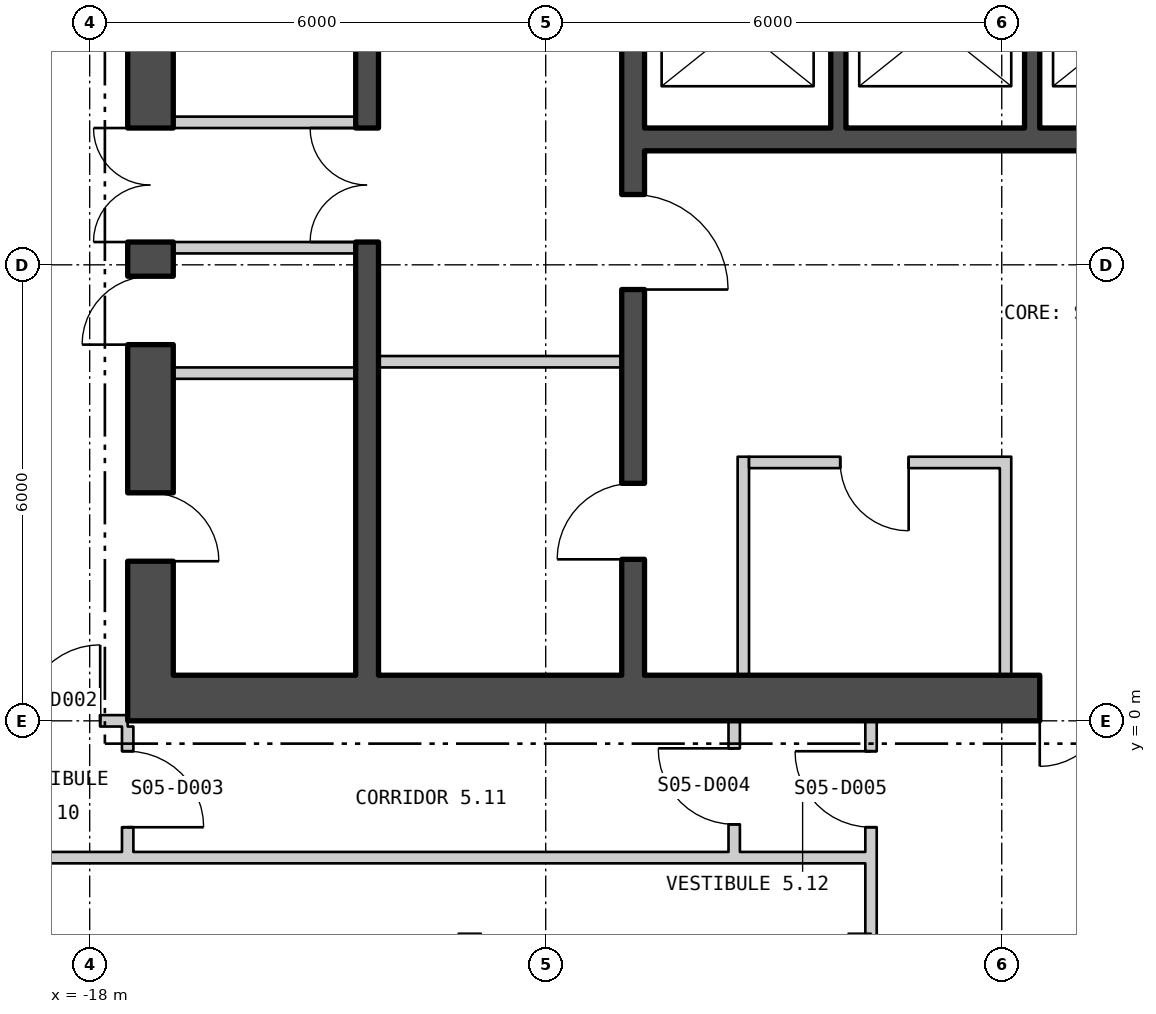
"""IFC4 building model, lengths in metres.
Left out: names, types, materials, properties, quantities, classifications, styles, units other than length and angle.
Written with IfcOpenShell. Run it as: python <this file> out.ifc"""

import sys

from ifc_helpers import new_model, si_unit, direction, frame, frame_2d, origin, origin_2d, place, context, subcontext, project, spatial, polyline, rectangle, i_section, outline, extrude, element, fill, save


model = new_model("IFC4")
c1 = context("Model", 3, precision=1e-05, world=origin(), true_north=direction((0.0, 1.0)))
c2 = subcontext(c1, "Body", "Model", "MODEL_VIEW")
j1 = project(units=[si_unit("LENGTHUNIT", "METRE"), si_unit("PLANEANGLEUNIT", "RADIAN")], contexts=[c1])
p1 = place(None, origin())
s1 = spatial("IfcSite", under=j1, at=p1, CompositionType="ELEMENT")
p2 = place(p1, origin())
s2 = spatial("IfcBuilding", under=s1, at=p2, CompositionType="ELEMENT")
p3 = place(p2, frame((0.0, 0.0, 69.3)))
s3 = spatial("IfcBuildingStorey", under=s2, at=p3, CompositionType="ELEMENT", Elevation=69.3)
for number, where, z_axis, x_axis in (
    (1, (-7.87, -3.2, 0.0), (0.0, 0.0, 1.0), (1.0, 0.0, 0.0)),
    (2, (-13.0, -3.2, 0.0), (0.0, 0.0, 1.0), (1.0, 0.0, 0.0)),
):
    element("IfcColumn", number, at=place(p3, frame(where, z_axis=z_axis, x_axis=x_axis)), inside=s3, PredefinedType="COLUMN", context=c2, shape_type="SweptSolid", body=[
        extrude(i_section(OverallWidth=0.303, OverallDepth=0.814, WebThickness=0.021, FlangeThickness=0.04, at=origin_2d()), origin(), (0.0, 0.0, 1.0), 4.5),
    ])
p4 = place(p3, frame((-28.18, 10.778, -0.18), z_axis=(0.0, 0.0, 1.0), x_axis=(0.500000711659, -0.866024992908, 0.0)))
e3 = element("IfcWall", 3, at=p4, inside=s3, PredefinedType="SOLIDWALL", context=c2, shape_type="SweptSolid", body=[
    extrude(outline(polyline([(-0.13, -0.225), (45.87, -0.225), (45.61, 0.225), (0.13, 0.225), (-0.13, -0.225)])), origin(), (0.0, 0.0, 1.0), 4.28),
])
p5 = place(p4, frame((1.424, 0.0, 1.08)))
e4 = element("IfcOpeningElement", 4, at=p5, cuts=e3, PredefinedType="OPENING", context=c2, shape_type="SweptSolid", body=[
    extrude(rectangle(XDim=2.4, YDim=2.6, at=frame_2d((1.2, 1.3))), frame((0.0, 0.235, 0.0), z_axis=(0.0, -1.0, 0.0), x_axis=(1.0, 0.0, 0.0)), (0.0, 0.0, 1.0), 0.47),
])
p6 = place(p4, frame((5.893, 0.0, 1.08)))
e5 = element("IfcOpeningElement", 5, at=p6, cuts=e3, PredefinedType="OPENING", context=c2, shape_type="SweptSolid", body=[
    extrude(rectangle(XDim=2.4, YDim=2.6, at=frame_2d((1.2, 1.3))), frame((0.0, 0.235, 0.0), z_axis=(0.0, -1.0, 0.0), x_axis=(1.0, 0.0, 0.0)), (0.0, 0.0, 1.0), 0.47),
])
p7 = place(p4, frame((10.401, 0.0, 1.08)))
e6 = element("IfcOpeningElement", 6, at=p7, cuts=e3, PredefinedType="OPENING", context=c2, shape_type="SweptSolid", body=[
    extrude(rectangle(XDim=2.4, YDim=2.6, at=frame_2d((1.2, 1.3))), frame((0.0, 0.235, 0.0), z_axis=(0.0, -1.0, 0.0), x_axis=(1.0, 0.0, 0.0)), (0.0, 0.0, 1.0), 0.47),
])
p8 = place(p4, frame((14.909, 0.0, 1.08)))
e7 = element("IfcOpeningElement", 7, at=p8, cuts=e3, PredefinedType="OPENING", context=c2, shape_type="SweptSolid", body=[
    extrude(rectangle(XDim=2.4, YDim=2.6, at=frame_2d((1.2, 1.3))), frame((0.0, 0.235, 0.0), z_axis=(0.0, -1.0, 0.0), x_axis=(1.0, 0.0, 0.0)), (0.0, 0.0, 1.0), 0.47),
])
p9 = place(p4, frame((19.416, 0.0, 1.08)))
e8 = element("IfcOpeningElement", 8, at=p9, cuts=e3, PredefinedType="OPENING", context=c2, shape_type="SweptSolid", body=[
    extrude(rectangle(XDim=2.4, YDim=2.6, at=frame_2d((1.2, 1.3))), frame((0.0, 0.235, 0.0), z_axis=(0.0, -1.0, 0.0), x_axis=(1.0, 0.0, 0.0)), (0.0, 0.0, 1.0), 0.47),
])
p10 = place(p4, frame((23.924, 0.0, 1.08)))
e9 = element("IfcOpeningElement", 9, at=p10, cuts=e3, PredefinedType="OPENING", context=c2, shape_type="SweptSolid", body=[
    extrude(rectangle(XDim=2.4, YDim=2.6, at=frame_2d((1.2, 1.3))), frame((0.0, 0.235, 0.0), z_axis=(0.0, -1.0, 0.0), x_axis=(1.0, 0.0, 0.0)), (0.0, 0.0, 1.0), 0.47),
])
p11 = place(p4, frame((28.431, 0.0, 1.08)))
e10 = element("IfcOpeningElement", 10, at=p11, cuts=e3, PredefinedType="OPENING", context=c2, shape_type="SweptSolid", body=[
    extrude(rectangle(XDim=2.4, YDim=2.6, at=frame_2d((1.2, 1.3))), frame((0.0, 0.235, 0.0), z_axis=(0.0, -1.0, 0.0), x_axis=(1.0, 0.0, 0.0)), (0.0, 0.0, 1.0), 0.47),
])
p12 = place(p4, frame((32.939, 0.0, 1.08)))
e11 = element("IfcOpeningElement", 11, at=p12, cuts=e3, PredefinedType="OPENING", context=c2, shape_type="SweptSolid", body=[
    extrude(rectangle(XDim=2.4, YDim=2.6, at=frame_2d((1.2, 1.3))), frame((0.0, 0.235, 0.0), z_axis=(0.0, -1.0, 0.0), x_axis=(1.0, 0.0, 0.0)), (0.0, 0.0, 1.0), 0.47),
])
p13 = place(p4, frame((37.447, 0.0, 1.08)))
e12 = element("IfcOpeningElement", 12, at=p13, cuts=e3, PredefinedType="OPENING", context=c2, shape_type="SweptSolid", body=[
    extrude(rectangle(XDim=2.4, YDim=2.6, at=frame_2d((1.2, 1.3))), frame((0.0, 0.235, 0.0), z_axis=(0.0, -1.0, 0.0), x_axis=(1.0, 0.0, 0.0)), (0.0, 0.0, 1.0), 0.47),
])
p14 = place(p4, frame((41.916, 0.0, 1.08)))
e13 = element("IfcOpeningElement", 13, at=p14, cuts=e3, PredefinedType="OPENING", context=c2, shape_type="SweptSolid", body=[
    extrude(rectangle(XDim=2.4, YDim=2.6, at=frame_2d((1.2, 1.3))), frame((0.0, 0.235, 0.0), z_axis=(0.0, -1.0, 0.0), x_axis=(1.0, 0.0, 0.0)), (0.0, 0.0, 1.0), 0.47),
])
p15 = place(p3, frame((-17.5, 0.3, 0.0), z_axis=(0.0, 0.0, 1.0), x_axis=(1.0, 0.0, 0.0)))
e14 = element("IfcWall", 14, at=p15, inside=s3, PredefinedType="SHEAR", context=c2, shape_type="SweptSolid", body=[
    extrude(rectangle(XDim=35.0, YDim=0.6, at=frame_2d((17.5, 0.0))), origin(), (0.0, 0.0, 1.0), 4.3),
])
p16 = place(p15, frame((12.0, 0.0, 0.0)))
e15 = element("IfcOpeningElement", 15, at=p16, cuts=e14, PredefinedType="OPENING", context=c2, shape_type="SweptSolid", body=[
    extrude(rectangle(XDim=1.8, YDim=2.4, at=frame_2d((0.9, 1.2))), frame((0.0, 0.31, 0.0), z_axis=(0.0, -1.0, 0.0), x_axis=(1.0, 0.0, 0.0)), (0.0, 0.0, 1.0), 0.62),
])
p17 = place(p15, frame((22.0, 0.0, 0.0)))
e16 = element("IfcOpeningElement", 16, at=p17, cuts=e14, PredefinedType="OPENING", context=c2, shape_type="SweptSolid", body=[
    extrude(rectangle(XDim=1.8, YDim=2.4, at=frame_2d((0.9, 1.2))), frame((0.0, 0.31, 0.0), z_axis=(0.0, -1.0, 0.0), x_axis=(1.0, 0.0, 0.0)), (0.0, 0.0, 1.0), 0.62),
])
p18 = place(p3, frame((-17.2, 0.6, 0.0), z_axis=(0.0, 0.0, 1.0), x_axis=(0.0, 1.0, 0.0)))
e17 = element("IfcWall", 17, at=p18, inside=s3, PredefinedType="SHEAR", context=c2, shape_type="SweptSolid", body=[
    extrude(rectangle(XDim=16.8, YDim=0.6, at=frame_2d((8.4, 0.0))), origin(), (0.0, 0.0, 1.0), 4.3),
])
p19 = place(p18, frame((5.7, 0.0, 0.0)))
e18 = element("IfcOpeningElement", 18, at=p19, cuts=e17, PredefinedType="OPENING", context=c2, shape_type="SweptSolid", body=[
    extrude(rectangle(XDim=1.5, YDim=2.1, at=frame_2d((0.75, 1.05))), frame((0.0, 0.31, 0.0), z_axis=(0.0, -1.0, 0.0), x_axis=(1.0, 0.0, 0.0)), (0.0, 0.0, 1.0), 0.62),
])
p20 = place(p18, frame((1.5, 0.0, 0.0)))
e19 = element("IfcOpeningElement", 19, at=p20, cuts=e17, PredefinedType="OPENING", context=c2, shape_type="SweptSolid", body=[
    extrude(rectangle(XDim=0.9, YDim=2.1, at=frame_2d((0.45, 1.05))), frame((0.0, 0.31, 0.0), z_axis=(0.0, -1.0, 0.0), x_axis=(1.0, 0.0, 0.0)), (0.0, 0.0, 1.0), 0.62),
])
p21 = place(p18, frame((4.35, 0.0, 0.0)))
e20 = element("IfcOpeningElement", 20, at=p21, cuts=e17, PredefinedType="OPENING", context=c2, shape_type="SweptSolid", body=[
    extrude(rectangle(XDim=0.9, YDim=2.1, at=frame_2d((0.45, 1.05))), frame((0.0, 0.31, 0.0), z_axis=(0.0, -1.0, 0.0), x_axis=(1.0, 0.0, 0.0)), (0.0, 0.0, 1.0), 0.62),
])
p22 = place(p18, frame((8.423, 0.0, 0.0)))
e21 = element("IfcOpeningElement", 21, at=p22, cuts=e17, PredefinedType="OPENING", context=c2, shape_type="SweptSolid", body=[
    extrude(rectangle(XDim=1.0, YDim=2.1, at=frame_2d((0.5, 1.05))), frame((0.0, 0.31, 0.0), z_axis=(0.0, -1.0, 0.0), x_axis=(1.0, 0.0, 0.0)), (0.0, 0.0, 1.0), 0.62),
])
p23 = place(p18, frame((13.273, 0.0, 0.0)))
e22 = element("IfcOpeningElement", 22, at=p23, cuts=e17, PredefinedType="OPENING", context=c2, shape_type="SweptSolid", body=[
    extrude(rectangle(XDim=0.9, YDim=2.1, at=frame_2d((0.45, 1.05))), frame((0.0, 0.31, 0.0), z_axis=(0.0, -1.0, 0.0), x_axis=(1.0, 0.0, 0.0)), (0.0, 0.0, 1.0), 0.62),
])
p24 = place(p3, frame((-10.85, 0.6, 0.0), z_axis=(0.0, 0.0, 1.0), x_axis=(0.0, 1.0, 0.0)))
e23 = element("IfcWall", 23, at=p24, inside=s3, PredefinedType="SHEAR", context=c2, shape_type="SweptSolid", body=[
    extrude(rectangle(XDim=16.8, YDim=0.3, at=frame_2d((8.4, 0.0))), origin(), (0.0, 0.0, 1.0), 4.3),
])
p25 = place(p24, frame((5.075, 0.0, 0.0)))
e24 = element("IfcOpeningElement", 24, at=p25, cuts=e23, PredefinedType="OPENING", context=c2, shape_type="SweptSolid", body=[
    extrude(rectangle(XDim=1.25, YDim=2.1, at=frame_2d((0.625, 1.05))), frame((0.0, 0.16, 0.0), z_axis=(0.0, -1.0, 0.0), x_axis=(1.0, 0.0, 0.0)), (0.0, 0.0, 1.0), 0.32),
])
p26 = place(p24, frame((1.525, 0.0, 0.0)))
e25 = element("IfcOpeningElement", 25, at=p26, cuts=e23, PredefinedType="OPENING", context=c2, shape_type="SweptSolid", body=[
    extrude(rectangle(XDim=1.0, YDim=2.1, at=frame_2d((0.5, 1.05))), frame((0.0, 0.16, 0.0), z_axis=(0.0, -1.0, 0.0), x_axis=(1.0, 0.0, 0.0)), (0.0, 0.0, 1.0), 0.32),
])
p27 = place(p3, frame((-14.35, 0.6, 0.0), z_axis=(0.0, 0.0, 1.0), x_axis=(0.0, 1.0, 0.0)))
e26 = element("IfcWall", 26, at=p27, inside=s3, PredefinedType="SHEAR", context=c2, shape_type="SweptSolid", body=[
    extrude(rectangle(XDim=16.8, YDim=0.3, at=frame_2d((8.4, 0.0))), origin(), (0.0, 0.0, 1.0), 4.3),
])
p28 = place(p27, frame((5.7, 0.0, 0.0)))
e27 = element("IfcOpeningElement", 27, at=p28, cuts=e26, PredefinedType="OPENING", context=c2, shape_type="SweptSolid", body=[
    extrude(rectangle(XDim=1.5, YDim=2.1, at=frame_2d((0.75, 1.05))), frame((0.0, 0.16, 0.0), z_axis=(0.0, -1.0, 0.0), x_axis=(1.0, 0.0, 0.0)), (0.0, 0.0, 1.0), 0.32),
])
p29 = place(p3, frame((-10.7, 7.65, 0.0), z_axis=(0.0, 0.0, 1.0), x_axis=(1.0, 0.0, 0.0)))
e28 = element("IfcWall", 28, at=p29, inside=s3, PredefinedType="SHEAR", context=c2, shape_type="SweptSolid", body=[
    extrude(rectangle(XDim=10.3, YDim=0.3, at=frame_2d((5.15, 0.0))), origin(), (0.0, 0.0, 1.0), 4.3),
])
for number, where, z_axis, x_axis in (
    (29, (-8.15, 7.8, 0.0), (0.0, 0.0, 1.0), (0.0, 1.0, 0.0)),
    (30, (-5.6, 7.8, 0.0), (0.0, 0.0, 1.0), (0.0, 1.0, 0.0)),
):
    element("IfcWall", number, at=place(p3, frame(where, z_axis=z_axis, x_axis=x_axis)), inside=s3, PredefinedType="SHEAR", context=c2, shape_type="SweptSolid", body=[
        extrude(rectangle(XDim=2.7, YDim=0.2, at=frame_2d((1.35, 0.0))), origin(), (0.0, 0.0, 1.0), 4.3),
    ])
p30 = place(p3, frame((-14.2, 4.725, 0.0), z_axis=(0.0, 0.0, 1.0), x_axis=(1.0, 0.0, 0.0)))
e31 = element("IfcWall", 31, at=p30, inside=s3, PredefinedType="PARTITIONING", context=c2, shape_type="SweptSolid", body=[
    extrude(rectangle(XDim=3.2, YDim=0.15, at=frame_2d((1.6, 0.0))), origin(), (0.0, 0.0, 1.0), 4.3),
])
for number, where, z_axis, x_axis in (
    (32, (-16.9, 6.225, 0.0), (0.0, 0.0, 1.0), (1.0, 0.0, 0.0)),
    (33, (-16.9, 7.875, 0.0), (0.0, 0.0, 1.0), (1.0, 0.0, 0.0)),
    (34, (-16.9, 4.575, 0.0), (0.0, 0.0, 1.0), (1.0, 0.0, 0.0)),
):
    element("IfcWall", number, at=place(p3, frame(where, z_axis=z_axis, x_axis=x_axis)), inside=s3, PredefinedType="PARTITIONING", context=c2, shape_type="SweptSolid", body=[
        extrude(rectangle(XDim=2.4, YDim=0.15, at=frame_2d((1.2, 0.0))), origin(), (0.0, 0.0, 1.0), 4.3),
    ])
for number, where, z_axis, x_axis in (
    (35, (-9.4, 0.6, 0.0), (0.0, 0.0, 1.0), (0.0, 1.0, 0.0)),
    (36, (-5.95, 0.6, 0.0), (0.0, 0.0, 1.0), (0.0, 1.0, 0.0)),
):
    element("IfcWall", number, at=place(p3, frame(where, z_axis=z_axis, x_axis=x_axis)), inside=s3, PredefinedType="PARTITIONING", context=c2, shape_type="SweptSolid", body=[
        extrude(rectangle(XDim=2.875, YDim=0.15, at=frame_2d((1.438, 0.0))), origin(), (0.0, 0.0, 1.0), 4.3),
    ])
p31 = place(p3, frame((-9.325, 3.4, 0.0), z_axis=(0.0, 0.0, 1.0), x_axis=(1.0, 0.0, 0.0)))
e37 = element("IfcWall", 37, at=p31, inside=s3, PredefinedType="PARTITIONING", context=c2, shape_type="SweptSolid", body=[
    extrude(rectangle(XDim=3.3, YDim=0.15, at=frame_2d((1.65, 0.0))), origin(), (0.0, 0.0, 1.0), 4.3),
])
p32 = place(p31, frame((1.2, 0.0, 0.0)))
e38 = element("IfcOpeningElement", 38, at=p32, cuts=e37, PredefinedType="OPENING", context=c2, shape_type="SweptSolid", body=[
    extrude(rectangle(XDim=0.9, YDim=2.1, at=frame_2d((0.45, 1.05))), frame((0.0, 0.085, 0.0), z_axis=(0.0, -1.0, 0.0), x_axis=(1.0, 0.0, 0.0)), (0.0, 0.0, 1.0), 0.17),
])
p33 = place(p3, frame((-19.225, -1.8, 0.0), z_axis=(0.0, 0.0, 1.0), x_axis=(1.0, 0.0, 0.0)))
e39 = element("IfcWall", 39, at=p33, inside=s3, PredefinedType="PARTITIONING", context=c2, shape_type="SweptSolid", body=[
    extrude(rectangle(XDim=11.43, YDim=0.15, at=frame_2d((5.715, 0.0))), origin(), (0.0, 0.0, 1.0), 4.3),
])
p34 = place(p3, frame((-19.225, 0.0, 0.0), z_axis=(0.0, 0.0, 1.0), x_axis=(1.0, 0.0, 0.0)))
e40 = element("IfcWall", 40, at=p34, inside=s3, PredefinedType="PARTITIONING", context=c2, shape_type="SweptSolid", body=[
    extrude(rectangle(XDim=1.725, YDim=0.15, at=frame_2d((0.863, 0.0))), origin(), (0.0, 0.0, 1.0), 3.61),
])
p35 = place(p34, frame((0.363, 0.0, 0.0)))
e41 = element("IfcOpeningElement", 41, at=p35, cuts=e40, PredefinedType="OPENING", context=c2, shape_type="SweptSolid", body=[
    extrude(rectangle(XDim=1.0, YDim=2.1, at=frame_2d((0.5, 1.05))), frame((0.0, 0.085, 0.0), z_axis=(0.0, -1.0, 0.0), x_axis=(1.0, 0.0, 0.0)), (0.0, 0.0, 1.0), 0.17),
])
p36 = place(p3, frame((-17.5, -1.725, 0.0), z_axis=(0.0, 0.0, 1.0), x_axis=(0.0, 1.0, 0.0)))
e42 = element("IfcWall", 42, at=p36, inside=s3, PredefinedType="PARTITIONING", context=c2, shape_type="SweptSolid", body=[
    extrude(rectangle(XDim=1.65, YDim=0.15, at=frame_2d((0.825, 0.0))), origin(), (0.0, 0.0, 1.0), 4.3),
])
p37 = place(p36, frame((0.325, 0.0, 0.0)))
e43 = element("IfcOpeningElement", 43, at=p37, cuts=e42, PredefinedType="OPENING", context=c2, shape_type="SweptSolid", body=[
    extrude(rectangle(XDim=1.0, YDim=2.1, at=frame_2d((0.5, 1.05))), frame((0.0, 0.085, 0.0), z_axis=(0.0, -1.0, 0.0), x_axis=(1.0, 0.0, 0.0)), (0.0, 0.0, 1.0), 0.17),
])
p38 = place(p3, frame((-9.52, -1.725, 0.0), z_axis=(0.0, 0.0, 1.0), x_axis=(0.0, 1.0, 0.0)))
e44 = element("IfcWall", 44, at=p38, inside=s3, PredefinedType="PARTITIONING", context=c2, shape_type="SweptSolid", body=[
    extrude(rectangle(XDim=1.725, YDim=0.15, at=frame_2d((0.863, 0.0))), origin(), (0.0, 0.0, 1.0), 3.7),
])
p39 = place(p38, frame((0.363, 0.0, 0.0)))
e45 = element("IfcOpeningElement", 45, at=p39, cuts=e44, PredefinedType="OPENING", context=c2, shape_type="SweptSolid", body=[
    extrude(rectangle(XDim=1.0, YDim=2.1, at=frame_2d((0.5, 1.05))), frame((0.0, 0.085, 0.0), z_axis=(0.0, -1.0, 0.0), x_axis=(1.0, 0.0, 0.0)), (0.0, 0.0, 1.0), 0.17),
])
p40 = place(p3, frame((-7.72, -3.557, 0.0), z_axis=(0.0, 0.0, 1.0), x_axis=(0.0, 1.0, 0.0)))
e46 = element("IfcWall", 46, at=p40, inside=s3, PredefinedType="PARTITIONING", context=c2, shape_type="SweptSolid", body=[
    extrude(rectangle(XDim=3.557, YDim=0.15, at=frame_2d((1.778, 0.0))), origin(), (0.0, 0.0, 1.0), 4.3),
])
p41 = place(p40, frame((2.157, 0.0, 0.0)))
e47 = element("IfcOpeningElement", 47, at=p41, cuts=e46, PredefinedType="OPENING", context=c2, shape_type="SweptSolid", body=[
    extrude(rectangle(XDim=1.0, YDim=2.1, at=frame_2d((0.5, 1.05))), frame((0.0, 0.085, 0.0), z_axis=(0.0, -1.0, 0.0), x_axis=(1.0, 0.0, 0.0)), (0.0, 0.0, 1.0), 0.17),
])
p42 = place(p25, origin())
e48 = element("IfcDoor", 48, at=p42, inside=s3, OperationType="SINGLE_SWING_LEFT", PredefinedType="DOOR", context=c2, shape_type="SweptSolid", body=[
    extrude(rectangle(XDim=1.25, YDim=2.1, at=frame_2d((0.625, 1.05))), frame((0.0, 0.025, 0.0), z_axis=(0.0, -1.0, 0.0), x_axis=(1.0, 0.0, 0.0)), (0.0, 0.0, 1.0), 0.05),
])
fill(e24, e48)
p43 = place(p26, origin())
e49 = element("IfcDoor", 49, at=p43, inside=s3, OperationType="SINGLE_SWING_RIGHT", PredefinedType="DOOR", context=c2, shape_type="SweptSolid", body=[
    extrude(rectangle(XDim=1.0, YDim=2.1, at=frame_2d((0.5, 1.05))), frame((0.0, 0.025, 0.0), z_axis=(0.0, -1.0, 0.0), x_axis=(1.0, 0.0, 0.0)), (0.0, 0.0, 1.0), 0.05),
])
fill(e25, e49)
p44 = place(p28, origin())
e50 = element("IfcDoor", 50, at=p44, inside=s3, OperationType="DOUBLE_DOOR_SINGLE_SWING", PredefinedType="DOOR", context=c2, shape_type="SweptSolid", body=[
    extrude(rectangle(XDim=1.5, YDim=2.1, at=frame_2d((0.75, 1.05))), frame((0.0, 0.025, 0.0), z_axis=(0.0, -1.0, 0.0), x_axis=(1.0, 0.0, 0.0)), (0.0, 0.0, 1.0), 0.05),
])
fill(e27, e50)
p45 = place(p19, origin())
e51 = element("IfcDoor", 51, at=p45, inside=s3, OperationType="DOUBLE_DOOR_SINGLE_SWING", PredefinedType="DOOR", context=c2, shape_type="SweptSolid", body=[
    extrude(rectangle(XDim=1.5, YDim=2.1, at=frame_2d((0.75, 1.05))), frame((0.0, 0.025, 0.0), z_axis=(0.0, -1.0, 0.0), x_axis=(1.0, 0.0, 0.0)), (0.0, 0.0, 1.0), 0.05),
])
fill(e18, e51)
p46 = place(p20, origin())
e52 = element("IfcDoor", 52, at=p46, inside=s3, OperationType="SINGLE_SWING_LEFT", PredefinedType="DOOR", context=c2, shape_type="SweptSolid", body=[
    extrude(rectangle(XDim=0.9, YDim=2.1, at=frame_2d((0.45, 1.05))), frame((0.0, 0.025, 0.0), z_axis=(0.0, -1.0, 0.0), x_axis=(1.0, 0.0, 0.0)), (0.0, 0.0, 1.0), 0.05),
])
fill(e19, e52)
p47 = place(p21, origin())
e53 = element("IfcDoor", 53, at=p47, inside=s3, OperationType="SINGLE_SWING_RIGHT", PredefinedType="DOOR", context=c2, shape_type="SweptSolid", body=[
    extrude(rectangle(XDim=0.9, YDim=2.1, at=frame_2d((0.45, 1.05))), frame((0.0, 0.025, 0.0), z_axis=(0.0, -1.0, 0.0), x_axis=(1.0, 0.0, 0.0)), (0.0, 0.0, 1.0), 0.05),
])
fill(e20, e53)
p48 = place(p32, origin())
e54 = element("IfcDoor", 54, at=p48, inside=s3, OperationType="SINGLE_SWING_RIGHT", PredefinedType="DOOR", context=c2, shape_type="SweptSolid", body=[
    extrude(rectangle(XDim=0.9, YDim=2.1, at=frame_2d((0.45, 1.05))), frame((0.0, 0.025, 0.0), z_axis=(0.0, -1.0, 0.0), x_axis=(1.0, 0.0, 0.0)), (0.0, 0.0, 1.0), 0.05),
])
fill(e38, e54)
p49 = place(p16, origin())
e55 = element("IfcDoor", 55, at=p49, inside=s3, OperationType="DOUBLE_DOOR_SINGLE_SWING", PredefinedType="DOOR", context=c2, shape_type="SweptSolid", body=[
    extrude(rectangle(XDim=1.8, YDim=2.4, at=frame_2d((0.9, 1.2))), frame((0.0, 0.025, 0.0), z_axis=(0.0, -1.0, 0.0), x_axis=(1.0, 0.0, 0.0)), (0.0, 0.0, 1.0), 0.05),
])
fill(e15, e55)
p50 = place(p35, origin())
e56 = element("IfcDoor", 56, at=p50, inside=s3, OperationType="SINGLE_SWING_LEFT", PredefinedType="DOOR", context=c2, shape_type="SweptSolid", body=[
    extrude(rectangle(XDim=1.0, YDim=2.1, at=frame_2d((0.5, 1.05))), frame((0.0, 0.025, 0.0), z_axis=(0.0, -1.0, 0.0), x_axis=(1.0, 0.0, 0.0)), (0.0, 0.0, 1.0), 0.05),
])
fill(e41, e56)
p51 = place(p37, origin())
e57 = element("IfcDoor", 57, at=p51, inside=s3, OperationType="SINGLE_SWING_LEFT", PredefinedType="DOOR", context=c2, shape_type="SweptSolid", body=[
    extrude(rectangle(XDim=1.0, YDim=2.1, at=frame_2d((0.5, 1.05))), frame((0.0, 0.025, 0.0), z_axis=(0.0, -1.0, 0.0), x_axis=(1.0, 0.0, 0.0)), (0.0, 0.0, 1.0), 0.05),
])
fill(e43, e57)
p52 = place(p39, origin())
e58 = element("IfcDoor", 58, at=p52, inside=s3, OperationType="SINGLE_SWING_LEFT", PredefinedType="DOOR", context=c2, shape_type="SweptSolid", body=[
    extrude(rectangle(XDim=1.0, YDim=2.1, at=frame_2d((0.5, 1.05))), frame((0.0, 0.025, 0.0), z_axis=(0.0, -1.0, 0.0), x_axis=(1.0, 0.0, 0.0)), (0.0, 0.0, 1.0), 0.05),
])
fill(e45, e58)
p53 = place(p41, origin())
e59 = element("IfcDoor", 59, at=p53, inside=s3, OperationType="SINGLE_SWING_LEFT", PredefinedType="DOOR", context=c2, shape_type="SweptSolid", body=[
    extrude(rectangle(XDim=1.0, YDim=2.1, at=frame_2d((0.5, 1.05))), frame((0.0, 0.025, 0.0), z_axis=(0.0, -1.0, 0.0), x_axis=(1.0, 0.0, 0.0)), (0.0, 0.0, 1.0), 0.05),
])
fill(e47, e59)
save(model, sys.argv[1])
